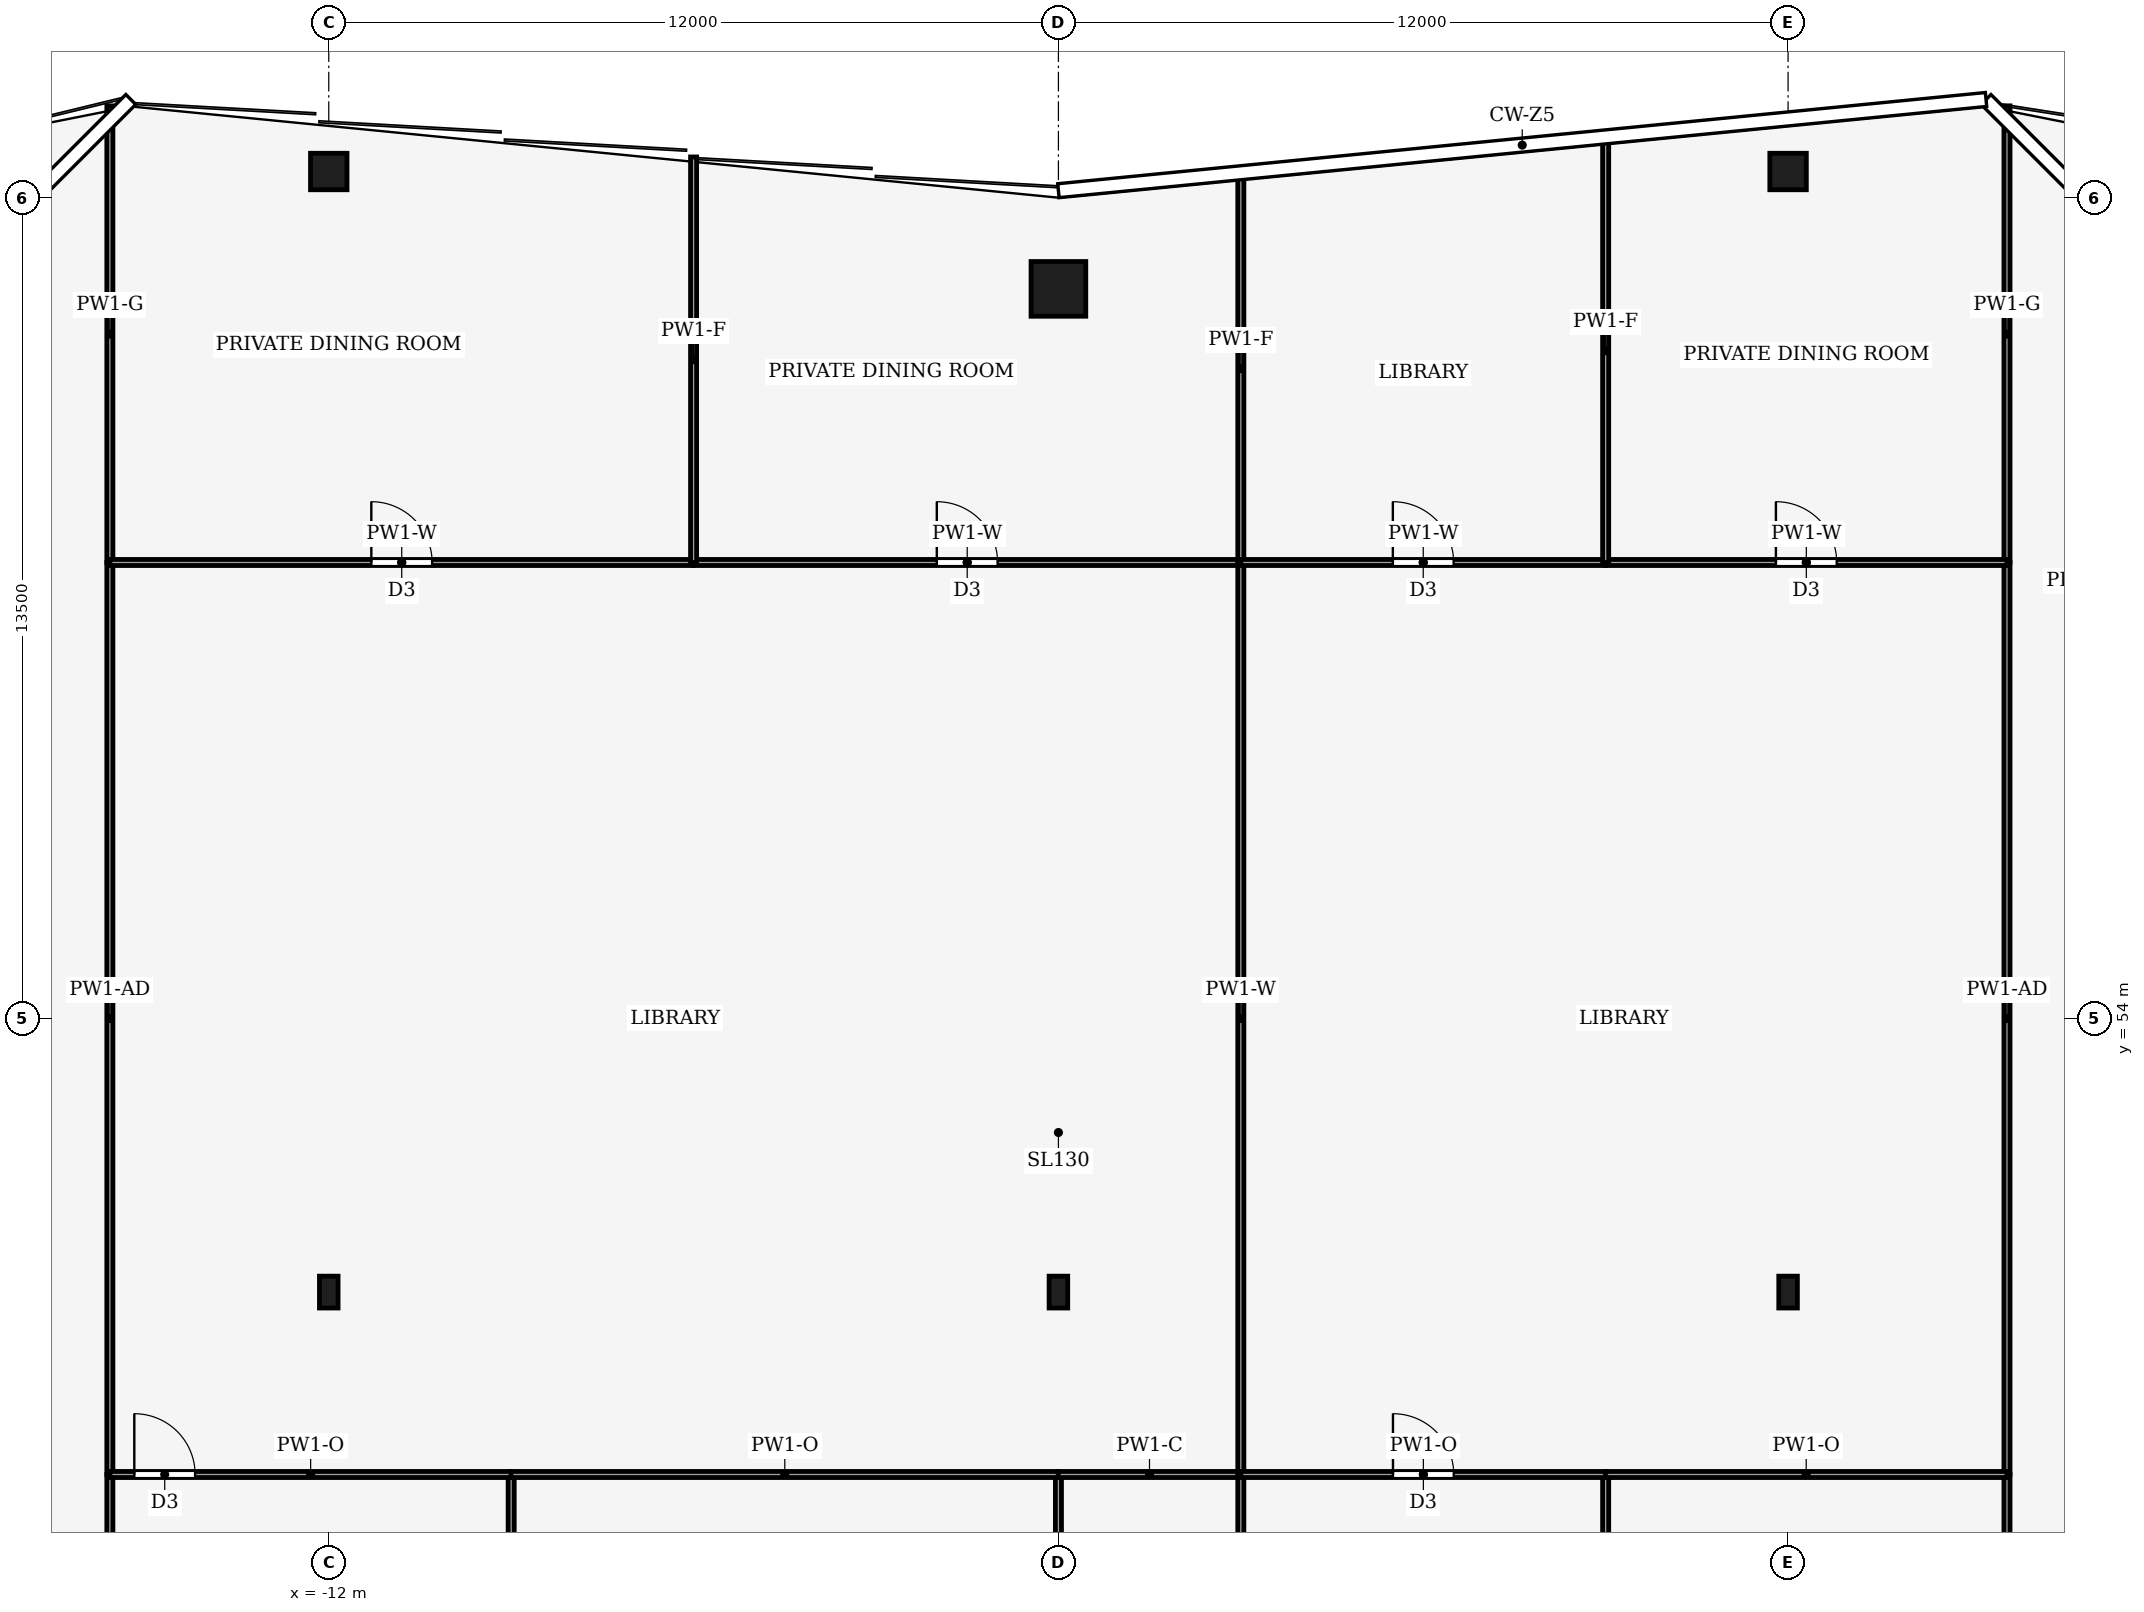
"""IFC4 building model, lengths in metres.
Left out: names, types, materials, properties, quantities, classifications, styles, units other than length and angle.
Written with IfcOpenShell. Run it as: python <this file> out.ifc"""

import sys

from ifc_helpers import new_model, si_unit, direction, frame, frame_2d, origin, origin_2d, place, context, subcontext, project, spatial, rectangle, hollow_rectangle, i_section, extrude, element, fill, save


model = new_model("IFC4")
c1 = context("Model", 3, precision=1e-05, world=origin(), true_north=direction((0.0, 1.0)))
c2 = subcontext(c1, "Body", "Model", "MODEL_VIEW")
j1 = project(units=[si_unit("LENGTHUNIT", "METRE"), si_unit("PLANEANGLEUNIT", "RADIAN")], contexts=[c1])
p1 = place(None, origin())
s1 = spatial("IfcSite", under=j1, at=p1, CompositionType="ELEMENT")
p2 = place(p1, origin())
s2 = spatial("IfcBuilding", under=s1, at=p2, CompositionType="ELEMENT")
p3 = place(p2, frame((0.0, 0.0, 326.0)))
s3 = spatial("IfcBuildingStorey", under=s2, at=p3, CompositionType="ELEMENT", Elevation=326.0)
p4 = place(p3, frame((0.0, 66.0, 0.0), z_axis=(0.0, 0.0, 1.0), x_axis=(1.0, 0.0, 0.0)))
e1 = element("IfcColumn", 1, at=p4, inside=s3, PredefinedType="COLUMN", context=c2, shape_type="SweptSolid", body=[
    extrude(hollow_rectangle(XDim=0.9, YDim=0.9, WallThickness=0.04, at=origin_2d()), origin(), (0.0, 0.0, 1.0), 4.0),
])
for number, where, z_axis, x_axis in (
    (2, (-12.0, 67.93, 0.0), (0.0, 0.0, 1.0), (1.0, 0.0, 0.0)),
    (3, (12.0, 67.93, 0.0), (0.0, 0.0, 1.0), (1.0, 0.0, 0.0)),
):
    element("IfcColumn", number, at=place(p3, frame(where, z_axis=z_axis, x_axis=x_axis)), inside=s3, PredefinedType="COLUMN", context=c2, shape_type="SweptSolid", body=[
        extrude(hollow_rectangle(XDim=0.6, YDim=0.6, WallThickness=0.025, at=origin_2d()), origin(), (0.0, 0.0, 1.0), 4.0),
    ])
for number, where, z_axis, x_axis in (
    (4, (-12.0, 49.5, 0.0), (0.0, 0.0, 1.0), (1.0, 0.0, 0.0)),
    (5, (0.0, 49.5, 0.0), (0.0, 0.0, 1.0), (1.0, 0.0, 0.0)),
    (6, (12.0, 49.5, 0.0), (0.0, 0.0, 1.0), (1.0, 0.0, 0.0)),
):
    element("IfcColumn", number, at=place(p3, frame(where, z_axis=z_axis, x_axis=x_axis)), inside=s3, PredefinedType="COLUMN", context=c2, shape_type="SweptSolid", body=[
        extrude(i_section(OverallWidth=0.306, OverallDepth=0.524, WebThickness=0.012, FlangeThickness=0.04, FilletRadius=0.027, at=origin_2d()), origin(), (0.0, 0.0, 1.0), 4.0),
    ])
p5 = place(p3, frame((-15.6, 40.6, 0.0), z_axis=(0.0, 0.0, 1.0), x_axis=(0.0, 1.0, 0.0)))
e7 = element("IfcWall", 7, at=p5, inside=s3, PredefinedType="PARTITIONING", context=c2, shape_type="SweptSolid", body=[
    extrude(rectangle(XDim=5.9, YDim=0.1, at=frame_2d((2.95, 0.0))), origin(), (0.0, 0.0, 1.0), 3.87),
])
p6 = place(p3, frame((-15.6, 46.5, 0.0), z_axis=(0.0, 0.0, 1.0), x_axis=(0.0, 1.0, 0.0)))
e8 = element("IfcWall", 8, at=p6, inside=s3, PredefinedType="PARTITIONING", context=c2, shape_type="SweptSolid", body=[
    extrude(rectangle(XDim=15.0, YDim=0.1, at=frame_2d((7.5, 0.0))), origin(), (0.0, 0.0, 1.0), 3.35),
])
p7 = place(p3, frame((-15.6, 61.5, 0.0), z_axis=(0.0, 0.0, 1.0), x_axis=(0.0, 1.0, 0.0)))
e9 = element("IfcWall", 9, at=p7, inside=s3, PredefinedType="PARTITIONING", context=c2, shape_type="SweptSolid", body=[
    extrude(rectangle(XDim=7.51, YDim=0.1, at=frame_2d((3.755, 0.0))), origin(), (0.0, 0.0, 1.0), 2.93),
])
p8 = place(p3, frame((15.6, 46.5, 0.0), z_axis=(0.0, 0.0, 1.0), x_axis=(0.0, -1.0, 0.0)))
e10 = element("IfcWall", 10, at=p8, inside=s3, PredefinedType="PARTITIONING", context=c2, shape_type="SweptSolid", body=[
    extrude(rectangle(XDim=5.9, YDim=0.1, at=frame_2d((2.95, 0.0))), origin(), (0.0, 0.0, 1.0), 3.87),
])
p9 = place(p3, frame((15.6, 61.5, 0.0), z_axis=(0.0, 0.0, 1.0), x_axis=(0.0, -1.0, 0.0)))
e11 = element("IfcWall", 11, at=p9, inside=s3, PredefinedType="PARTITIONING", context=c2, shape_type="SweptSolid", body=[
    extrude(rectangle(XDim=15.0, YDim=0.1, at=frame_2d((7.5, 0.0))), origin(), (0.0, 0.0, 1.0), 3.35),
])
p10 = place(p3, frame((15.6, 69.01, 0.0), z_axis=(0.0, 0.0, 1.0), x_axis=(0.0, -1.0, 0.0)))
e12 = element("IfcWall", 12, at=p10, inside=s3, PredefinedType="PARTITIONING", context=c2, shape_type="SweptSolid", body=[
    extrude(rectangle(XDim=7.51, YDim=0.1, at=frame_2d((3.755, 0.0))), origin(), (0.0, 0.0, 1.0), 2.93),
])
p11 = place(p3, frame((-9.0, 40.6, 0.0), z_axis=(0.0, 0.0, 1.0), x_axis=(0.0, 1.0, 0.0)))
e13 = element("IfcWall", 13, at=p11, inside=s3, PredefinedType="PARTITIONING", context=c2, shape_type="SweptSolid", body=[
    extrude(rectangle(XDim=5.9, YDim=0.1, at=frame_2d((2.95, 0.0))), origin(), (0.0, 0.0, 1.0), 3.87),
])
p12 = place(p3, frame((-15.6, 46.5, 0.0), z_axis=(0.0, 0.0, 1.0), x_axis=(1.0, 0.0, 0.0)))
e14 = element("IfcWall", 14, at=p12, inside=s3, PredefinedType="PARTITIONING", context=c2, shape_type="SweptSolid", body=[
    extrude(rectangle(XDim=6.604, YDim=0.1, at=frame_2d((3.302, 0.0))), origin(), (0.0, 0.0, 1.0), 3.39),
])
p13 = place(p12, frame((0.402, 0.0, 0.0)))
e15 = element("IfcOpeningElement", 15, at=p13, cuts=e14, PredefinedType="OPENING", context=c2, shape_type="SweptSolid", body=[
    extrude(rectangle(XDim=1.0, YDim=2.1, at=frame_2d((0.5, 1.05))), frame((0.0, 0.06, 0.0), z_axis=(0.0, -1.0, 0.0), x_axis=(1.0, 0.0, 0.0)), (0.0, 0.0, 1.0), 0.12),
])
p14 = place(p3, frame((0.0, 40.6, 0.0), z_axis=(0.0, 0.0, 1.0), x_axis=(0.0, 1.0, 0.0)))
e16 = element("IfcWall", 16, at=p14, inside=s3, PredefinedType="PARTITIONING", context=c2, shape_type="SweptSolid", body=[
    extrude(rectangle(XDim=5.9, YDim=0.1, at=frame_2d((2.95, 0.0))), origin(), (0.0, 0.0, 1.0), 3.39),
])
p15 = place(p3, frame((0.004, 46.5, 0.0), z_axis=(0.0, 0.0, 1.0), x_axis=(-1.0, 0.0, 0.0)))
e17 = element("IfcWall", 17, at=p15, inside=s3, PredefinedType="PARTITIONING", context=c2, shape_type="SweptSolid", body=[
    extrude(rectangle(XDim=9.008, YDim=0.1, at=frame_2d((4.504, 0.0))), origin(), (0.0, 0.0, 1.0), 3.39),
])
p16 = place(p3, frame((3.0, 46.5, 0.0), z_axis=(0.0, 0.0, 1.0), x_axis=(-1.0, 0.0, 0.0)))
e18 = element("IfcWall", 18, at=p16, inside=s3, PredefinedType="PARTITIONING", context=c2, shape_type="SweptSolid", body=[
    extrude(rectangle(XDim=3.004, YDim=0.1, at=frame_2d((1.502, 0.0))), origin(), (0.0, 0.0, 1.0), 3.87),
])
p17 = place(p3, frame((3.0, 40.6, 0.0), z_axis=(0.0, 0.0, 1.0), x_axis=(0.0, 1.0, 0.0)))
e19 = element("IfcWall", 19, at=p17, inside=s3, PredefinedType="PARTITIONING", context=c2, shape_type="SweptSolid", body=[
    extrude(rectangle(XDim=5.9, YDim=0.1, at=frame_2d((2.95, 0.0))), origin(), (0.0, 0.0, 1.0), 3.87),
])
p18 = place(p3, frame((-15.6, 61.5, 0.0), z_axis=(0.0, 0.0, 1.0), x_axis=(1.0, 0.0, 0.0)))
e20 = element("IfcWall", 20, at=p18, inside=s3, PredefinedType="PARTITIONING", context=c2, shape_type="SweptSolid", body=[
    extrude(rectangle(XDim=9.6, YDim=0.1, at=frame_2d((4.8, 0.0))), origin(), (0.0, 0.0, 1.0), 3.24),
])
p19 = place(p18, frame((4.3, 0.0, 0.0)))
e21 = element("IfcOpeningElement", 21, at=p19, cuts=e20, PredefinedType="OPENING", context=c2, shape_type="SweptSolid", body=[
    extrude(rectangle(XDim=1.0, YDim=2.1, at=frame_2d((0.5, 1.05))), frame((0.0, 0.06, 0.0), z_axis=(0.0, -1.0, 0.0), x_axis=(1.0, 0.0, 0.0)), (0.0, 0.0, 1.0), 0.12),
])
p20 = place(p3, frame((-6.0, 61.5, 0.0), z_axis=(0.0, 0.0, 1.0), x_axis=(1.0, 0.0, 0.0)))
e22 = element("IfcWall", 22, at=p20, inside=s3, PredefinedType="PARTITIONING", context=c2, shape_type="SweptSolid", body=[
    extrude(rectangle(XDim=9.0, YDim=0.1, at=frame_2d((4.5, 0.0))), origin(), (0.0, 0.0, 1.0), 3.24),
])
p21 = place(p20, frame((4.0, 0.0, 0.0)))
e23 = element("IfcOpeningElement", 23, at=p21, cuts=e22, PredefinedType="OPENING", context=c2, shape_type="SweptSolid", body=[
    extrude(rectangle(XDim=1.0, YDim=2.1, at=frame_2d((0.5, 1.05))), frame((0.0, 0.06, 0.0), z_axis=(0.0, -1.0, 0.0), x_axis=(1.0, 0.0, 0.0)), (0.0, 0.0, 1.0), 0.12),
])
p22 = place(p3, frame((3.0, 46.5, 0.0), z_axis=(0.0, 0.0, 1.0), x_axis=(0.0, 1.0, 0.0)))
e24 = element("IfcWall", 24, at=p22, inside=s3, PredefinedType="PARTITIONING", context=c2, shape_type="SweptSolid", body=[
    extrude(rectangle(XDim=15.0, YDim=0.1, at=frame_2d((7.5, 0.0))), origin(), (0.0, 0.0, 1.0), 3.24),
])
p23 = place(p3, frame((-6.0, 61.5, 0.0), z_axis=(0.0, 0.0, 1.0), x_axis=(0.0, 1.0, 0.0)))
e25 = element("IfcWall", 25, at=p23, inside=s3, PredefinedType="PARTITIONING", context=c2, shape_type="SweptSolid", body=[
    extrude(rectangle(XDim=6.67, YDim=0.1, at=frame_2d((3.335, 0.0))), origin(), (0.0, 0.0, 1.0), 3.04),
])
p24 = place(p3, frame((3.0, 61.5, 0.0), z_axis=(0.0, 0.0, 1.0), x_axis=(0.0, 1.0, 0.0)))
e26 = element("IfcWall", 26, at=p24, inside=s3, PredefinedType="PARTITIONING", context=c2, shape_type="SweptSolid", body=[
    extrude(rectangle(XDim=6.375, YDim=0.1, at=frame_2d((3.188, 0.0))), origin(), (0.0, 0.0, 1.0), 3.04),
])
p25 = place(p3, frame((9.0, 40.6, 0.0), z_axis=(0.0, 0.0, 1.0), x_axis=(0.0, 1.0, 0.0)))
e27 = element("IfcWall", 27, at=p25, inside=s3, PredefinedType="PARTITIONING", context=c2, shape_type="SweptSolid", body=[
    extrude(rectangle(XDim=5.9, YDim=0.1, at=frame_2d((2.95, 0.0))), origin(), (0.0, 0.0, 1.0), 3.87),
])
p26 = place(p3, frame((3.0, 46.5, 0.0), z_axis=(0.0, 0.0, 1.0), x_axis=(1.0, 0.0, 0.0)))
e28 = element("IfcWall", 28, at=p26, inside=s3, PredefinedType="PARTITIONING", context=c2, shape_type="SweptSolid", body=[
    extrude(rectangle(XDim=6.004, YDim=0.1, at=frame_2d((3.002, 0.0))), origin(), (0.0, 0.0, 1.0), 3.39),
])
p27 = place(p26, frame((2.502, 0.0, 0.0)))
e29 = element("IfcOpeningElement", 29, at=p27, cuts=e28, PredefinedType="OPENING", context=c2, shape_type="SweptSolid", body=[
    extrude(rectangle(XDim=1.0, YDim=2.1, at=frame_2d((0.5, 1.05))), frame((0.0, 0.06, 0.0), z_axis=(0.0, -1.0, 0.0), x_axis=(1.0, 0.0, 0.0)), (0.0, 0.0, 1.0), 0.12),
])
p28 = place(p3, frame((15.6, 46.5, 0.0), z_axis=(0.0, 0.0, 1.0), x_axis=(-1.0, 0.0, 0.0)))
e30 = element("IfcWall", 30, at=p28, inside=s3, PredefinedType="PARTITIONING", context=c2, shape_type="SweptSolid", body=[
    extrude(rectangle(XDim=6.604, YDim=0.1, at=frame_2d((3.302, 0.0))), origin(), (0.0, 0.0, 1.0), 3.39),
])
p29 = place(p3, frame((3.0, 61.5, 0.0), z_axis=(0.0, 0.0, 1.0), x_axis=(1.0, 0.0, 0.0)))
e31 = element("IfcWall", 31, at=p29, inside=s3, PredefinedType="PARTITIONING", context=c2, shape_type="SweptSolid", body=[
    extrude(rectangle(XDim=6.0, YDim=0.1, at=frame_2d((3.0, 0.0))), origin(), (0.0, 0.0, 1.0), 3.24),
])
p30 = place(p29, frame((2.5, 0.0, 0.0)))
e32 = element("IfcOpeningElement", 32, at=p30, cuts=e31, PredefinedType="OPENING", context=c2, shape_type="SweptSolid", body=[
    extrude(rectangle(XDim=1.0, YDim=2.1, at=frame_2d((0.5, 1.05))), frame((0.0, 0.06, 0.0), z_axis=(0.0, -1.0, 0.0), x_axis=(1.0, 0.0, 0.0)), (0.0, 0.0, 1.0), 0.12),
])
p31 = place(p3, frame((9.0, 61.5, 0.0), z_axis=(0.0, 0.0, 1.0), x_axis=(1.0, 0.0, 0.0)))
e33 = element("IfcWall", 33, at=p31, inside=s3, PredefinedType="PARTITIONING", context=c2, shape_type="SweptSolid", body=[
    extrude(rectangle(XDim=6.6, YDim=0.1, at=frame_2d((3.3, 0.0))), origin(), (0.0, 0.0, 1.0), 3.24),
])
p32 = place(p31, frame((2.8, 0.0, 0.0)))
e34 = element("IfcOpeningElement", 34, at=p32, cuts=e33, PredefinedType="OPENING", context=c2, shape_type="SweptSolid", body=[
    extrude(rectangle(XDim=1.0, YDim=2.1, at=frame_2d((0.5, 1.05))), frame((0.0, 0.06, 0.0), z_axis=(0.0, -1.0, 0.0), x_axis=(1.0, 0.0, 0.0)), (0.0, 0.0, 1.0), 0.12),
])
p33 = place(p3, frame((9.0, 61.5, 0.0), z_axis=(0.0, 0.0, 1.0), x_axis=(0.0, 1.0, 0.0)))
e35 = element("IfcWall", 35, at=p33, inside=s3, PredefinedType="PARTITIONING", context=c2, shape_type="SweptSolid", body=[
    extrude(rectangle(XDim=6.965, YDim=0.1, at=frame_2d((3.482, 0.0))), origin(), (0.0, 0.0, 1.0), 3.04),
])
p34 = place(p13, origin())
e36 = element("IfcDoor", 36, at=p34, inside=s3, OperationType="SINGLE_SWING_LEFT", PredefinedType="DOOR", context=c2, shape_type="SweptSolid", body=[
    extrude(rectangle(XDim=1.0, YDim=2.1, at=frame_2d((0.5, 1.05))), frame((0.0, 0.025, 0.0), z_axis=(0.0, -1.0, 0.0), x_axis=(1.0, 0.0, 0.0)), (0.0, 0.0, 1.0), 0.05),
])
fill(e15, e36)
p35 = place(p19, origin())
e37 = element("IfcDoor", 37, at=p35, inside=s3, OperationType="SINGLE_SWING_LEFT", PredefinedType="DOOR", context=c2, shape_type="SweptSolid", body=[
    extrude(rectangle(XDim=1.0, YDim=2.1, at=frame_2d((0.5, 1.05))), frame((0.0, 0.025, 0.0), z_axis=(0.0, -1.0, 0.0), x_axis=(1.0, 0.0, 0.0)), (0.0, 0.0, 1.0), 0.05),
])
fill(e21, e37)
p36 = place(p21, origin())
e38 = element("IfcDoor", 38, at=p36, inside=s3, OperationType="SINGLE_SWING_RIGHT", PredefinedType="DOOR", context=c2, shape_type="SweptSolid", body=[
    extrude(rectangle(XDim=1.0, YDim=2.1, at=frame_2d((0.5, 1.05))), frame((0.0, 0.025, 0.0), z_axis=(0.0, -1.0, 0.0), x_axis=(1.0, 0.0, 0.0)), (0.0, 0.0, 1.0), 0.05),
])
fill(e23, e38)
p37 = place(p27, origin())
e39 = element("IfcDoor", 39, at=p37, inside=s3, OperationType="SINGLE_SWING_LEFT", PredefinedType="DOOR", context=c2, shape_type="SweptSolid", body=[
    extrude(rectangle(XDim=1.0, YDim=2.1, at=frame_2d((0.5, 1.05))), frame((0.0, 0.025, 0.0), z_axis=(0.0, -1.0, 0.0), x_axis=(1.0, 0.0, 0.0)), (0.0, 0.0, 1.0), 0.05),
])
fill(e29, e39)
p38 = place(p30, origin())
e40 = element("IfcDoor", 40, at=p38, inside=s3, OperationType="SINGLE_SWING_RIGHT", PredefinedType="DOOR", context=c2, shape_type="SweptSolid", body=[
    extrude(rectangle(XDim=1.0, YDim=2.1, at=frame_2d((0.5, 1.05))), frame((0.0, 0.025, 0.0), z_axis=(0.0, -1.0, 0.0), x_axis=(1.0, 0.0, 0.0)), (0.0, 0.0, 1.0), 0.05),
])
fill(e32, e40)
p39 = place(p32, origin())
e41 = element("IfcDoor", 41, at=p39, inside=s3, OperationType="SINGLE_SWING_LEFT", PredefinedType="DOOR", context=c2, shape_type="SweptSolid", body=[
    extrude(rectangle(XDim=1.0, YDim=2.1, at=frame_2d((0.5, 1.05))), frame((0.0, 0.025, 0.0), z_axis=(0.0, -1.0, 0.0), x_axis=(1.0, 0.0, 0.0)), (0.0, 0.0, 1.0), 0.05),
])
fill(e34, e41)
save(model, sys.argv[1])
